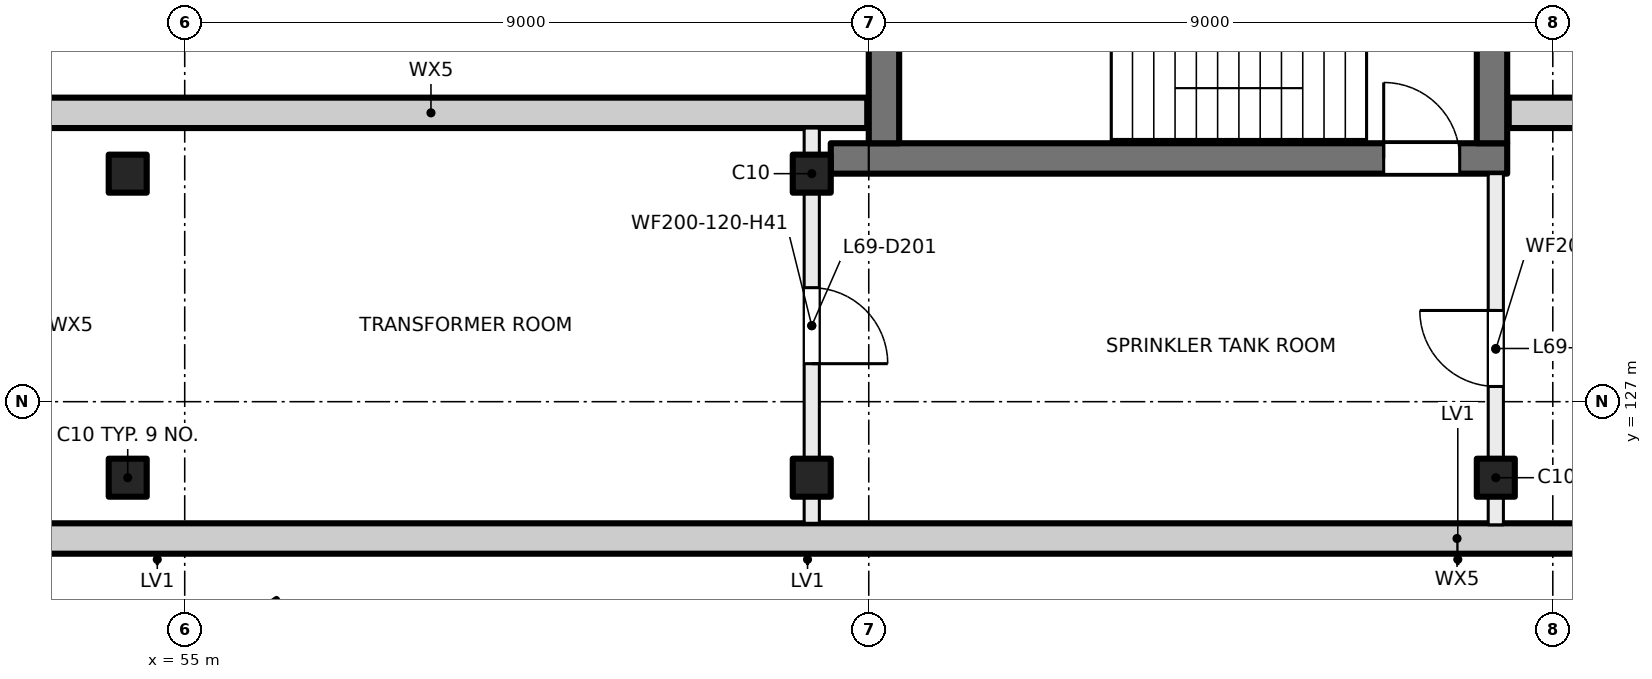
"""IFC4 building model, lengths in metres.
Left out: names, types, materials, properties, quantities, classifications, styles, units other than length and angle.
Written with IfcOpenShell. Run it as: python <this file> out.ifc"""

import sys

from ifc_helpers import new_model, si_unit, direction, frame, frame_2d, origin, origin_2d, place, context, subcontext, project, spatial, rectangle, hollow_rectangle, extrude, element, fill, save


model = new_model("IFC4")
c1 = context("Model", 3, precision=1e-05, world=origin(), true_north=direction((0.0, 1.0)))
c2 = subcontext(c1, "Body", "Model", "MODEL_VIEW")
j1 = project(units=[si_unit("LENGTHUNIT", "METRE"), si_unit("PLANEANGLEUNIT", "RADIAN")], contexts=[c1])
p1 = place(None, origin())
s1 = spatial("IfcSite", under=j1, at=p1, CompositionType="ELEMENT")
p2 = place(p1, origin())
s2 = spatial("IfcBuilding", under=s1, at=p2, CompositionType="ELEMENT")
p3 = place(p2, frame((0.0, 0.0, 291.0)))
s3 = spatial("IfcBuildingStorey", under=s2, at=p3, CompositionType="ELEMENT", Elevation=291.0)
p4 = place(p3, frame((56.036, 123.43, 0.0), z_axis=(0.0, 0.0, 1.0), x_axis=(0.573576436351, -0.819152044289, 0.0)))
e1 = element("IfcColumn", 1, at=p4, inside=s3, PredefinedType="COLUMN", context=c2, shape_type="SweptSolid", body=[
    extrude(hollow_rectangle(XDim=1.4, YDim=1.4, WallThickness=0.025, at=origin_2d()), origin(), (0.0, 0.0, 1.0), 4.5),
])
for number, where, z_axis, x_axis in (
    (2, (54.25, 130.0, 0.0), (0.0, 0.0, 1.0), (1.0, 0.0, 0.0)),
    (3, (63.25, 130.0, 0.0), (0.0, 0.0, 1.0), (1.0, 0.0, 0.0)),
    (4, (54.25, 126.0, 0.0), (0.0, 0.0, 1.0), (1.0, 0.0, 0.0)),
    (5, (63.25, 126.0, 0.0), (0.0, 0.0, 1.0), (1.0, 0.0, 0.0)),
    (6, (72.25, 126.0, 0.0), (0.0, 0.0, 1.0), (1.0, 0.0, 0.0)),
):
    element("IfcColumn", number, at=place(p3, frame(where, z_axis=z_axis, x_axis=x_axis)), inside=s3, PredefinedType="COLUMN", context=c2, shape_type="SweptSolid", body=[
        extrude(rectangle(XDim=0.5, YDim=0.5, at=origin_2d()), origin(), (0.0, 0.0, 1.0), 4.5),
    ])
p5 = place(p3, frame((63.5, 130.2, 0.0), z_axis=(0.0, 0.0, 1.0), x_axis=(1.0, 0.0, 0.0)))
e7 = element("IfcWall", 7, at=p5, inside=s3, PredefinedType="SHEAR", context=c2, shape_type="SweptSolid", body=[
    extrude(rectangle(XDim=8.9, YDim=0.4, at=frame_2d((4.45, 0.0))), origin(), (0.0, 0.0, 1.0), 4.5),
])
p6 = place(p5, frame((7.275, 0.0, 0.0)))
e8 = element("IfcOpeningElement", 8, at=p6, cuts=e7, PredefinedType="OPENING", context=c2, shape_type="SweptSolid", body=[
    extrude(rectangle(XDim=1.0, YDim=2.1, at=frame_2d((0.5, 1.05))), frame((0.0, 0.21, 0.0), z_axis=(0.0, -1.0, 0.0), x_axis=(1.0, 0.0, 0.0)), (0.0, 0.0, 1.0), 0.42),
])
for number, where, z_axis, x_axis in (
    (9, (64.2, 130.4, 0.0), (0.0, 0.0, 1.0), (0.0, 1.0, 0.0)),
    (10, (72.2, 130.4, 0.0), (0.0, 0.0, 1.0), (0.0, 1.0, 0.0)),
):
    element("IfcWall", number, at=place(p3, frame(where, z_axis=z_axis, x_axis=x_axis)), inside=s3, PredefinedType="SHEAR", context=c2, shape_type="SweptSolid", body=[
        extrude(rectangle(XDim=3.0, YDim=0.4, at=frame_2d((1.5, 0.0))), origin(), (0.0, 0.0, 1.0), 4.5),
    ])
p7 = place(p3, frame((52.5, 130.8, 0.0), z_axis=(0.0, 0.0, 1.0), x_axis=(1.0, 0.0, 0.0)))
e11 = element("IfcWall", 11, at=p7, inside=s3, PredefinedType="SOLIDWALL", context=c2, shape_type="SweptSolid", body=[
    extrude(rectangle(XDim=11.48, YDim=0.4, at=frame_2d((5.74, 0.0))), origin(), (0.0, 0.0, 1.0), 4.125),
])
p8 = place(p3, frame((90.98, 125.2, 0.0), z_axis=(0.0, 0.0, 1.0), x_axis=(-1.0, 0.0, 0.0)))
e12 = element("IfcWall", 12, at=p8, inside=s3, PredefinedType="SOLIDWALL", context=c2, shape_type="SweptSolid", body=[
    extrude(rectangle(XDim=38.48, YDim=0.4, at=frame_2d((19.24, 0.0))), origin(), (0.0, 0.0, 1.0), 4.125),
])
p9 = place(p3, frame((72.42, 130.8, 0.0), z_axis=(0.0, 0.0, 1.0), x_axis=(1.0, 0.0, 0.0)))
e13 = element("IfcWall", 13, at=p9, inside=s3, PredefinedType="SOLIDWALL", context=c2, shape_type="SweptSolid", body=[
    extrude(rectangle(XDim=18.56, YDim=0.4, at=frame_2d((9.28, 0.0))), origin(), (0.0, 0.0, 1.0), 4.125),
])
p10 = place(p3, frame((63.25, 130.6, 0.0), z_axis=(0.0, 0.0, 1.0), x_axis=(0.0, -1.0, 0.0)))
e14 = element("IfcWall", 14, at=p10, inside=s3, PredefinedType="PARTITIONING", context=c2, shape_type="SweptSolid", body=[
    extrude(rectangle(XDim=5.2, YDim=0.2, at=frame_2d((2.6, 0.0))), origin(), (0.0, 0.0, 1.0), 4.125),
])
p11 = place(p10, frame((2.1, 0.0, 0.0)))
e15 = element("IfcOpeningElement", 15, at=p11, cuts=e14, PredefinedType="OPENING", context=c2, shape_type="SweptSolid", body=[
    extrude(rectangle(XDim=1.0, YDim=2.1, at=frame_2d((0.5, 1.05))), frame((0.0, 0.11, 0.0), z_axis=(0.0, -1.0, 0.0), x_axis=(1.0, 0.0, 0.0)), (0.0, 0.0, 1.0), 0.22),
])
p12 = place(p3, frame((72.25, 130.0, 0.0), z_axis=(0.0, 0.0, 1.0), x_axis=(0.0, -1.0, 0.0)))
e16 = element("IfcWall", 16, at=p12, inside=s3, PredefinedType="PARTITIONING", context=c2, shape_type="SweptSolid", body=[
    extrude(rectangle(XDim=4.62, YDim=0.2, at=frame_2d((2.31, 0.0))), origin(), (0.0, 0.0, 1.0), 4.125),
])
p13 = place(p12, frame((1.8, 0.0, 0.0)))
e17 = element("IfcOpeningElement", 17, at=p13, cuts=e16, PredefinedType="OPENING", context=c2, shape_type="SweptSolid", body=[
    extrude(rectangle(XDim=1.0, YDim=2.1, at=frame_2d((0.5, 1.05))), frame((0.0, 0.11, 0.0), z_axis=(0.0, -1.0, 0.0), x_axis=(1.0, 0.0, 0.0)), (0.0, 0.0, 1.0), 0.22),
])
p14 = place(p6, origin())
e18 = element("IfcDoor", 18, at=p14, inside=s3, OperationType="SINGLE_SWING_LEFT", PredefinedType="DOOR", context=c2, shape_type="SweptSolid", body=[
    extrude(rectangle(XDim=1.0, YDim=2.1, at=frame_2d((0.5, 1.05))), frame((0.0, 0.025, 0.0), z_axis=(0.0, -1.0, 0.0), x_axis=(1.0, 0.0, 0.0)), (0.0, 0.0, 1.0), 0.05),
])
fill(e8, e18)
p15 = place(p11, origin())
e19 = element("IfcDoor", 19, at=p15, inside=s3, OperationType="SINGLE_SWING_RIGHT", PredefinedType="DOOR", context=c2, shape_type="SweptSolid", body=[
    extrude(rectangle(XDim=1.0, YDim=2.1, at=frame_2d((0.5, 1.05))), frame((0.0, 0.025, 0.0), z_axis=(0.0, -1.0, 0.0), x_axis=(1.0, 0.0, 0.0)), (0.0, 0.0, 1.0), 0.05),
])
fill(e15, e19)
p16 = place(p13, origin())
e20 = element("IfcDoor", 20, at=p16, inside=s3, OperationType="SINGLE_SWING_LEFT", PredefinedType="DOOR", context=c2, shape_type="SweptSolid", body=[
    extrude(rectangle(XDim=1.0, YDim=2.1, at=frame_2d((0.5, 1.05))), frame((0.0, 0.025, 0.0), z_axis=(0.0, -1.0, 0.0), x_axis=(1.0, 0.0, 0.0)), (0.0, 0.0, 1.0), 0.05),
])
fill(e17, e20)
save(model, sys.argv[1])
